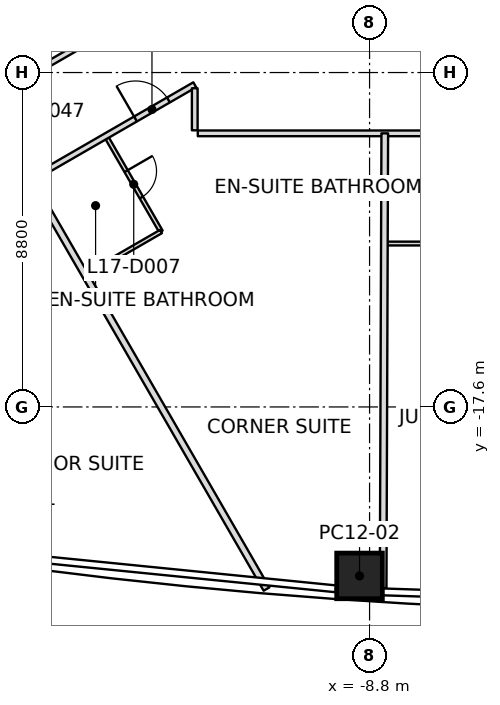
"""IFC4 building model, lengths in metres.
Left out: names, types, materials, properties, quantities, classifications, styles, units other than length and angle.
Written with IfcOpenShell. Run it as: python <this file> out.ifc"""

import sys

from ifc_helpers import new_model, si_unit, direction, frame, frame_2d, origin, origin_2d, place, context, subcontext, project, spatial, rectangle, extrude, element, fill, save


model = new_model("IFC4")
c1 = context("Model", 3, precision=1e-05, world=origin(), true_north=direction((0.0, 1.0)))
c2 = subcontext(c1, "Body", "Model", "MODEL_VIEW")
j1 = project(units=[si_unit("LENGTHUNIT", "METRE"), si_unit("PLANEANGLEUNIT", "RADIAN")], contexts=[c1])
p1 = place(None, origin())
s1 = spatial("IfcSite", under=j1, at=p1, CompositionType="ELEMENT")
p2 = place(p1, origin())
s2 = spatial("IfcBuilding", under=s1, at=p2, CompositionType="ELEMENT")
p3 = place(p2, frame((0.0, 0.0, 85.0)))
s3 = spatial("IfcBuildingStorey", under=s2, at=p3, CompositionType="ELEMENT", Elevation=85.0)
p4 = place(p3, frame((-9.064, -22.046, 0.0), z_axis=(0.00963262733, 0.012139749512, 0.999879912276), x_axis=(-0.99775239864, 0.06642749461, 0.008805621326)))
e1 = element("IfcColumn", 1, at=p4, inside=s3, PredefinedType="COLUMN", context=c2, shape_type="SweptSolid", body=[
    extrude(rectangle(XDim=1.2, YDim=1.2, at=origin_2d()), origin(), (0.0, 0.0, 1.0), 3.7),
])
p5 = place(p3, frame((-17.73, -11.622, 0.0), z_axis=(0.0, 0.0, 1.0), x_axis=(0.499981892896, -0.866035857673, 0.0)))
e2 = element("IfcWall", 2, at=p5, inside=s3, PredefinedType="PARTITIONING", context=c2, shape_type="SweptSolid", body=[
    extrude(rectangle(XDim=12.436, YDim=0.175, at=frame_2d((6.218, 0.0))), origin(), (0.0, 0.0, 1.0), 2.784),
])
p6 = place(p3, frame((-8.4, -10.4, 0.0), z_axis=(0.0, 0.0, 1.0), x_axis=(-0.003610968563, -0.999993480432, 0.0)))
e3 = element("IfcWall", 3, at=p6, inside=s3, PredefinedType="PARTITIONING", context=c2, shape_type="SweptSolid", body=[
    extrude(rectangle(XDim=11.967, YDim=0.175, at=frame_2d((5.983, 0.0))), origin(), (0.0, 0.0, 1.0), 2.784),
])
p7 = place(p3, frame((-13.4, -6.351, 0.0), z_axis=(0.0, 0.0, 1.0), x_axis=(-0.866025625133, -0.499999616612, 0.0)))
e4 = element("IfcWall", 4, at=p7, inside=s3, PredefinedType="PARTITIONING", context=c2, shape_type="SweptSolid", body=[
    extrude(rectangle(XDim=11.59, YDim=0.15, at=frame_2d((5.795, 0.0))), origin(), (0.0, 0.0, 1.0), 2.947),
])
p8 = place(p7, frame((9.07, 0.0, 0.0)))
e5 = element("IfcOpeningElement", 5, at=p8, cuts=e4, PredefinedType="OPENING", context=c2, shape_type="SweptSolid", body=[
    extrude(rectangle(XDim=1.0, YDim=2.1, at=frame_2d((0.5, 1.05))), frame((0.0, 0.075, 0.0), z_axis=(0.0, -1.0, 0.0), x_axis=(1.0, 0.0, 0.0)), (0.0, 0.0, 1.0), 0.15),
])
p9 = place(p3, frame((-22.237, -14.224, 0.0), z_axis=(0.0, 0.0, 1.0), x_axis=(0.866018645883, 0.500011704846, 0.0)))
e6 = element("IfcWall", 6, at=p9, inside=s3, PredefinedType="PARTITIONING", context=c2, shape_type="SweptSolid", body=[
    extrude(rectangle(XDim=10.204, YDim=0.15, at=frame_2d((5.102, 0.0))), origin(), (0.0, 0.0, 1.0), 2.797),
])
p10 = place(p9, frame((3.262, 0.0, 0.0)))
e7 = element("IfcOpeningElement", 7, at=p10, cuts=e6, PredefinedType="OPENING", context=c2, shape_type="SweptSolid", body=[
    extrude(rectangle(XDim=1.0, YDim=2.1, at=frame_2d((0.5, 1.05))), frame((0.0, 0.075, 0.0), z_axis=(0.0, -1.0, 0.0), x_axis=(1.0, 0.0, 0.0)), (0.0, 0.0, 1.0), 0.15),
])
p11 = place(p9, frame((8.404, 0.0, 0.0)))
e8 = element("IfcOpeningElement", 8, at=p11, cuts=e6, PredefinedType="OPENING", context=c2, shape_type="SweptSolid", body=[
    extrude(rectangle(XDim=1.0, YDim=2.1, at=frame_2d((0.5, 1.05))), frame((0.0, 0.075, 0.0), z_axis=(0.0, -1.0, 0.0), x_axis=(1.0, 0.0, 0.0)), (0.0, 0.0, 1.0), 0.15),
])
p12 = place(p3, frame((-13.4, -9.214, 0.0), z_axis=(0.0, 0.0, 1.0), x_axis=(0.0, -1.0, 0.0)))
e9 = element("IfcWall", 9, at=p12, inside=s3, PredefinedType="PARTITIONING", context=c2, shape_type="SweptSolid", body=[
    extrude(rectangle(XDim=1.106, YDim=0.15, at=frame_2d((0.553, 0.0))), origin(), (0.0, 0.0, 1.0), 2.797),
])
p13 = place(p3, frame((-13.32, -10.4, 0.0), z_axis=(0.0, 0.0, 1.0), x_axis=(1.0, 0.0, 0.0)))
e10 = element("IfcWall", 10, at=p13, inside=s3, PredefinedType="PARTITIONING", context=c2, shape_type="SweptSolid", body=[
    extrude(rectangle(XDim=26.64, YDim=0.15, at=frame_2d((13.32, 0.0))), origin(), (0.0, 0.0, 1.0), 2.797),
])
p14 = place(p13, frame((7.72, 0.0, 0.0)))
e11 = element("IfcOpeningElement", 11, at=p14, cuts=e10, PredefinedType="OPENING", context=c2, shape_type="SweptSolid", body=[
    extrude(rectangle(XDim=1.0, YDim=2.1, at=frame_2d((0.5, 1.05))), frame((0.0, 0.075, 0.0), z_axis=(0.0, -1.0, 0.0), x_axis=(1.0, 0.0, 0.0)), (0.0, 0.0, 1.0), 0.15),
])
p15 = place(p13, frame((11.92, 0.0, 0.0)))
e12 = element("IfcOpeningElement", 12, at=p15, cuts=e10, PredefinedType="OPENING", context=c2, shape_type="SweptSolid", body=[
    extrude(rectangle(XDim=1.0, YDim=2.1, at=frame_2d((0.5, 1.05))), frame((0.0, 0.075, 0.0), z_axis=(0.0, -1.0, 0.0), x_axis=(1.0, 0.0, 0.0)), (0.0, 0.0, 1.0), 0.15),
])
p16 = place(p13, frame((16.52, 0.0, 0.0)))
e13 = element("IfcOpeningElement", 13, at=p16, cuts=e10, PredefinedType="OPENING", context=c2, shape_type="SweptSolid", body=[
    extrude(rectangle(XDim=1.0, YDim=2.1, at=frame_2d((0.5, 1.05))), frame((0.0, 0.075, 0.0), z_axis=(0.0, -1.0, 0.0), x_axis=(1.0, 0.0, 0.0)), (0.0, 0.0, 1.0), 0.15),
])
p17 = place(p13, frame((21.12, 0.0, 0.0)))
e14 = element("IfcOpeningElement", 14, at=p17, cuts=e10, PredefinedType="OPENING", context=c2, shape_type="SweptSolid", body=[
    extrude(rectangle(XDim=1.0, YDim=2.1, at=frame_2d((0.5, 1.05))), frame((0.0, 0.075, 0.0), z_axis=(0.0, -1.0, 0.0), x_axis=(1.0, 0.0, 0.0)), (0.0, 0.0, 1.0), 0.15),
])
p18 = place(p3, frame((-15.723, -10.498, 0.0), z_axis=(0.0, 0.0, 1.0), x_axis=(0.499999802827, -0.866025517622, 0.0)))
e15 = element("IfcWall", 15, at=p18, inside=s3, PredefinedType="PARTITIONING", context=c2, shape_type="SweptSolid", body=[
    extrude(rectangle(XDim=2.87, YDim=0.1, at=frame_2d((1.435, 0.0))), origin(), (0.0, 0.0, 1.0), 2.797),
])
p19 = place(p18, frame((1.035, 0.0, 0.0)))
e16 = element("IfcOpeningElement", 16, at=p19, cuts=e15, PredefinedType="OPENING", context=c2, shape_type="SweptSolid", body=[
    extrude(rectangle(XDim=0.8, YDim=2.1, at=frame_2d((0.4, 1.05))), frame((0.0, 0.05, 0.0), z_axis=(0.0, -1.0, 0.0), x_axis=(1.0, 0.0, 0.0)), (0.0, 0.0, 1.0), 0.1),
])
p20 = place(p3, frame((-14.288, -12.984, 0.0), z_axis=(0.0, 0.0, 1.0), x_axis=(-0.866017224141, -0.500014167291, 0.0)))
e17 = element("IfcWall", 17, at=p20, inside=s3, PredefinedType="PARTITIONING", context=c2, shape_type="SweptSolid", body=[
    extrude(rectangle(XDim=2.27, YDim=0.1, at=frame_2d((1.135, 0.0))), origin(), (0.0, 0.0, 1.0), 2.943),
])
p21 = place(p3, frame((-6.1, -13.3, 0.0), z_axis=(0.0, 0.0, 1.0), x_axis=(-1.0, 0.0, 0.0)))
e18 = element("IfcWall", 18, at=p21, inside=s3, PredefinedType="PARTITIONING", context=c2, shape_type="SweptSolid", body=[
    extrude(rectangle(XDim=2.27, YDim=0.1, at=frame_2d((1.135, 0.0))), origin(), (0.0, 0.0, 1.0), 3.0),
])
p22 = place(p11, origin())
e19 = element("IfcDoor", 19, at=p22, inside=s3, OperationType="SINGLE_SWING_LEFT", PredefinedType="DOOR", context=c2, shape_type="SweptSolid", body=[
    extrude(rectangle(XDim=1.0, YDim=2.1, at=frame_2d((0.5, 1.05))), frame((0.0, 0.025, 0.0), z_axis=(0.0, -1.0, 0.0), x_axis=(1.0, 0.0, 0.0)), (0.0, 0.0, 1.0), 0.05),
])
fill(e8, e19)
p23 = place(p19, origin())
e20 = element("IfcDoor", 20, at=p23, inside=s3, OperationType="SINGLE_SWING_RIGHT", PredefinedType="DOOR", context=c2, shape_type="SweptSolid", body=[
    extrude(rectangle(XDim=0.8, YDim=2.1, at=frame_2d((0.4, 1.05))), frame((0.0, 0.025, 0.0), z_axis=(0.0, -1.0, 0.0), x_axis=(1.0, 0.0, 0.0)), (0.0, 0.0, 1.0), 0.05),
])
fill(e16, e20)
save(model, sys.argv[1])
